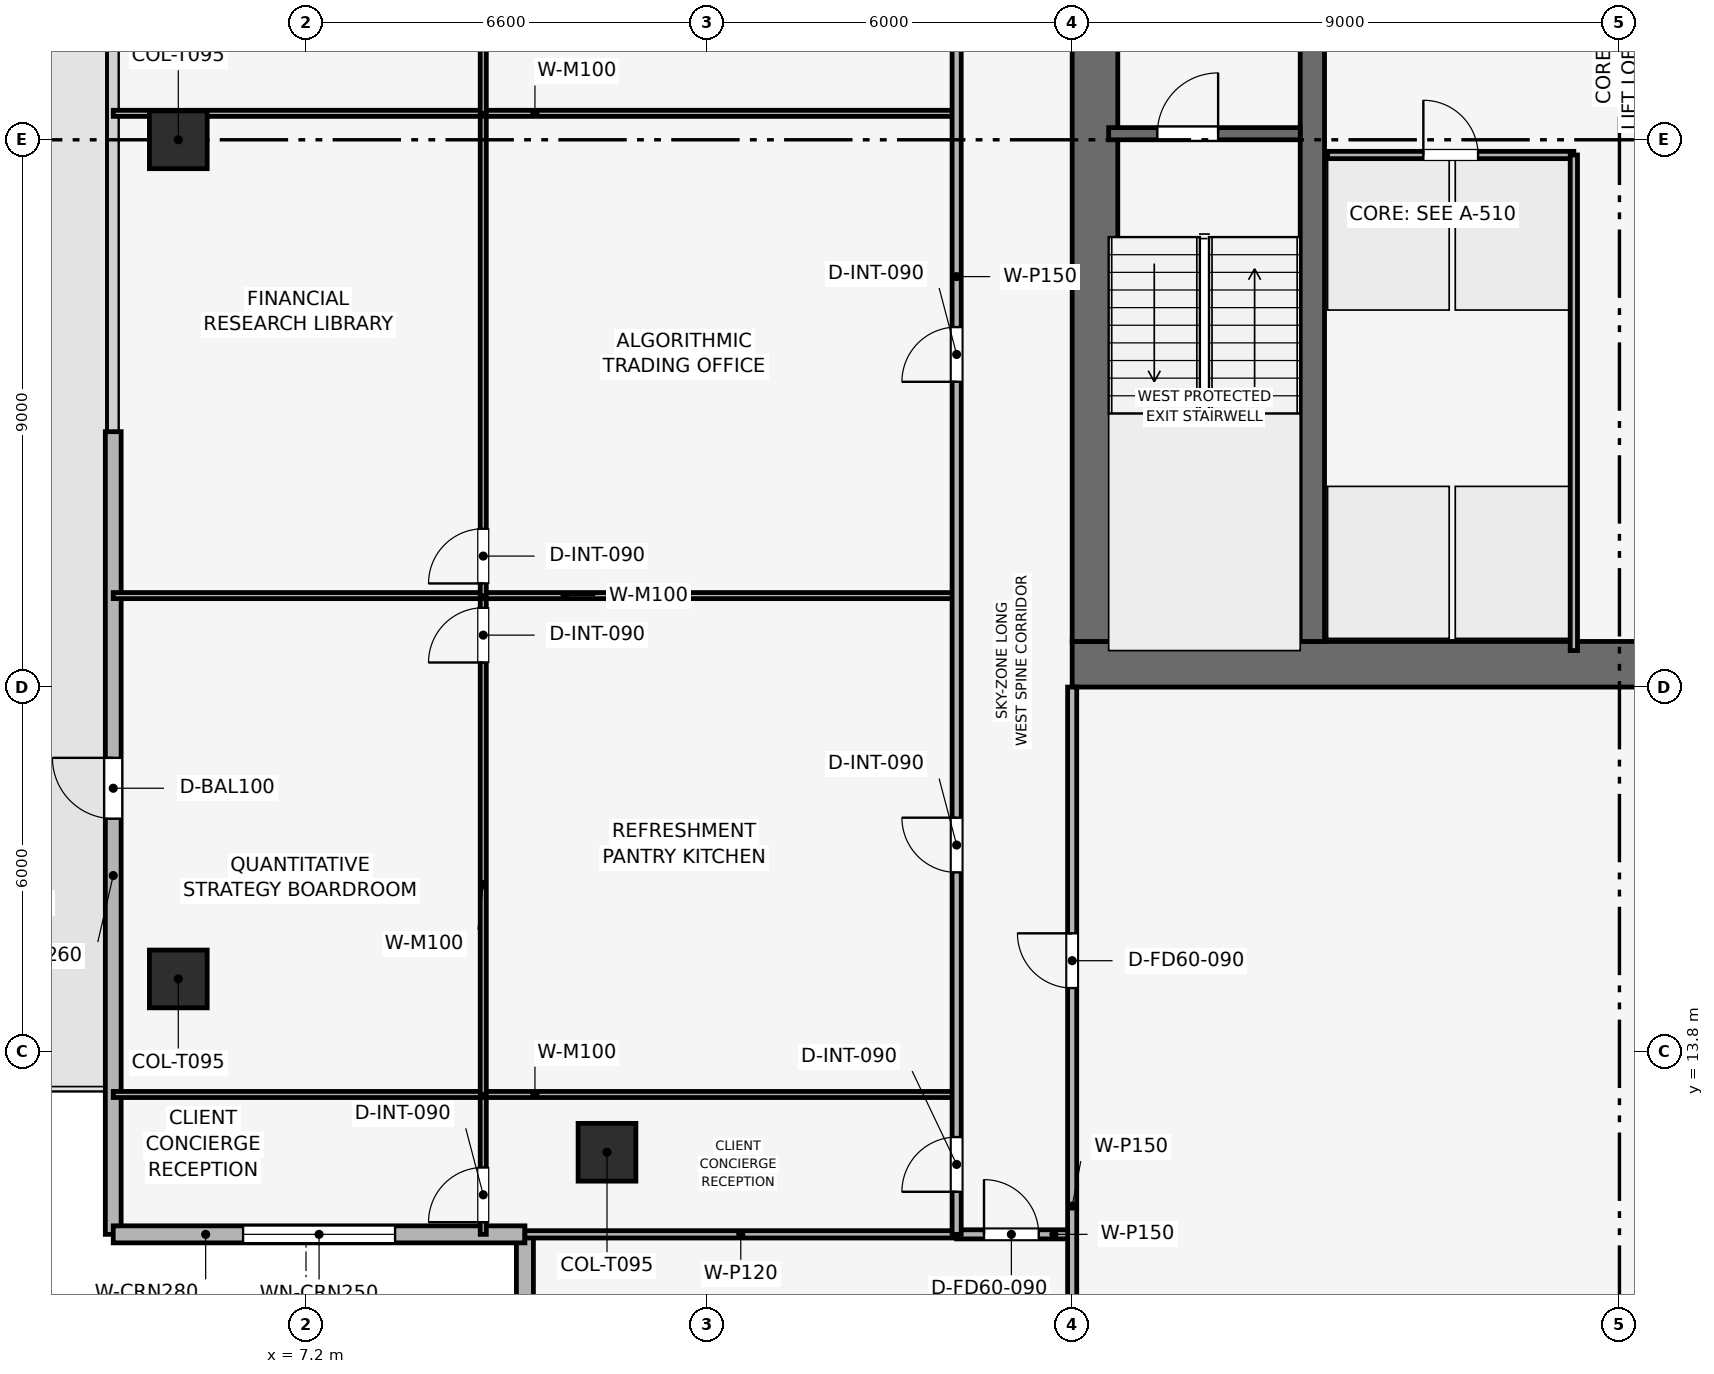
"""IFC4 building model, lengths in metres.
Left out: names, types, materials, properties, quantities, classifications, styles, units other than length and angle.
Written with IfcOpenShell. Run it as: python <this file> out.ifc"""

import sys

from ifc_helpers import new_model, si_unit, direction, frame, frame_2d, origin, origin_2d, place, context, subcontext, project, spatial, rectangle, extrude, element, fill, save


model = new_model("IFC4")
c1 = context("Model", 3, precision=1e-05, world=origin(), true_north=direction((0.0, 1.0)))
c2 = subcontext(c1, "Body", "Model", "MODEL_VIEW")
j1 = project(units=[si_unit("LENGTHUNIT", "METRE"), si_unit("PLANEANGLEUNIT", "RADIAN")], contexts=[c1])
p1 = place(None, origin())
s1 = spatial("IfcSite", under=j1, at=p1, CompositionType="ELEMENT")
p2 = place(p1, origin())
s2 = spatial("IfcBuilding", under=s1, at=p2, CompositionType="ELEMENT")
p3 = place(p2, frame((0.0, 0.0, 257.85)))
s3 = spatial("IfcBuildingStorey", under=s2, at=p3, CompositionType="ELEMENT", Elevation=257.85)
p4 = place(p3, frame((19.8, 20.175, 0.0), z_axis=(0.0, 0.0, 1.0), x_axis=(1.0, 0.0, 0.0)))
e1 = element("IfcWall", 1, at=p4, inside=s3, PredefinedType="SHEAR", context=c2, shape_type="SweptSolid", body=[
    extrude(rectangle(XDim=18.0, YDim=0.75, at=frame_2d((9.0, 0.0))), origin(), (0.0, 0.0, 1.0), 3.75),
])
p5 = place(p3, frame((20.175, 20.55, 0.0), z_axis=(0.0, 0.0, 1.0), x_axis=(0.0, 1.0, 0.0)))
e2 = element("IfcWall", 2, at=p5, inside=s3, PredefinedType="SHEAR", context=c2, shape_type="SweptSolid", body=[
    extrude(rectangle(XDim=16.5, YDim=0.75, at=frame_2d((8.25, 0.0))), origin(), (0.0, 0.0, 1.0), 3.75),
])
p6 = place(p5, frame((10.25, 0.0, 0.0)))
e3 = element("IfcOpeningElement", 3, at=p6, cuts=e2, PredefinedType="OPENING", context=c2, shape_type="SweptSolid", body=[
    extrude(rectangle(XDim=1.1, YDim=2.15, at=frame_2d((0.55, 1.075))), frame((0.0, 0.385, 0.0), z_axis=(0.0, -1.0, 0.0), x_axis=(1.0, 0.0, 0.0)), (0.0, 0.0, 1.0), 0.77),
])
p7 = place(p3, frame((23.75, 20.55, 0.0), z_axis=(0.0, 0.0, 1.0), x_axis=(0.0, 1.0, 0.0)))
e4 = element("IfcWall", 4, at=p7, inside=s3, PredefinedType="SHEAR", context=c2, shape_type="SweptSolid", body=[
    extrude(rectangle(XDim=16.5, YDim=0.4, at=frame_2d((8.25, 0.0))), origin(), (0.0, 0.0, 1.0), 3.75),
])
for number, where, z_axis, x_axis in (
    (5, (5.1, 28.8, 0.003), (0.0, 0.0, 1.0), (1.0, 0.0, 0.0)),
    (6, (5.1, 15.0, 0.003), (0.0, 0.0, 1.0), (1.0, 0.0, 0.0)),
    (7, (12.15, 12.15, 0.003), (0.0, 0.0, 1.0), (1.0, 0.0, 0.0)),
):
    element("IfcColumn", number, at=place(p3, frame(where, z_axis=z_axis, x_axis=x_axis)), inside=s3, PredefinedType="COLUMN", context=c2, shape_type="SweptSolid", body=[
        extrude(rectangle(XDim=0.95, YDim=0.95, at=origin_2d()), origin(), (0.0, 0.0, 1.0), 3.494),
    ])
p8 = place(p3, frame((4.03, 10.8, 0.0), z_axis=(0.0, 0.0, 1.0), x_axis=(0.0, 1.0, 0.0)))
e8 = element("IfcWall", 8, at=p8, inside=s3, PredefinedType="SOLIDWALL", context=c2, shape_type="SweptSolid", body=[
    extrude(rectangle(XDim=13.2, YDim=0.26, at=frame_2d((6.6, 0.0))), origin(), (0.0, 0.0, 1.0), 3.5),
])
p9 = place(p8, frame((6.836, 0.0, 0.0)))
e9 = element("IfcOpeningElement", 9, at=p9, cuts=e8, PredefinedType="OPENING", context=c2, shape_type="SweptSolid", body=[
    extrude(rectangle(XDim=1.0, YDim=2.2, at=frame_2d((0.5, 1.1))), frame((0.0, 0.14, 0.0), z_axis=(0.0, -1.0, 0.0), x_axis=(1.0, 0.0, 0.0)), (0.0, 0.0, 1.0), 0.28),
])
p10 = place(p3, frame((10.8, 4.03, 0.0), z_axis=(0.0, 0.0, 1.0), x_axis=(0.0, 1.0, 0.0)))
e10 = element("IfcWall", 10, at=p10, inside=s3, PredefinedType="SOLIDWALL", context=c2, shape_type="SweptSolid", body=[
    extrude(rectangle(XDim=6.77, YDim=0.28, at=frame_2d((3.385, 0.0))), origin(), (0.0, 0.0, 1.0), 3.5),
])
p11 = place(p10, frame((2.135, 0.0, 0.9)))
e11 = element("IfcOpeningElement", 11, at=p11, cuts=e10, PredefinedType="OPENING", context=c2, shape_type="SweptSolid", body=[
    extrude(rectangle(XDim=2.5, YDim=1.9, at=frame_2d((1.25, 0.95))), frame((0.0, 0.15, 0.0), z_axis=(0.0, -1.0, 0.0), x_axis=(1.0, 0.0, 0.0)), (0.0, 0.0, 1.0), 0.3),
])
p12 = place(p3, frame((10.8, 10.8, 0.0), z_axis=(0.0, 0.0, 1.0), x_axis=(-1.0, 0.0, 0.0)))
e12 = element("IfcWall", 12, at=p12, inside=s3, PredefinedType="SOLIDWALL", context=c2, shape_type="SweptSolid", body=[
    extrude(rectangle(XDim=6.77, YDim=0.28, at=frame_2d((3.385, 0.0))), origin(), (0.0, 0.0, 1.0), 3.5),
])
p13 = place(p12, frame((2.135, 0.0, 0.9)))
e13 = element("IfcOpeningElement", 13, at=p13, cuts=e12, PredefinedType="OPENING", context=c2, shape_type="SweptSolid", body=[
    extrude(rectangle(XDim=2.5, YDim=1.9, at=frame_2d((1.25, 0.95))), frame((0.0, 0.15, 0.0), z_axis=(0.0, -1.0, 0.0), x_axis=(1.0, 0.0, 0.0)), (0.0, 0.0, 1.0), 0.3),
])
p14 = place(p3, frame((20.4, 28.9, 0.0), z_axis=(0.0, 0.0, 1.0), x_axis=(1.0, 0.0, 0.0)))
e14 = element("IfcWall", 14, at=p14, inside=s3, PredefinedType="SHEAR", context=c2, shape_type="SweptSolid", body=[
    extrude(rectangle(XDim=3.15, YDim=0.2, at=frame_2d((1.575, 0.0))), origin(), (0.0, 0.0, 1.0), 3.5),
])
p15 = place(p14, frame((0.8, 0.0, 0.0)))
e15 = element("IfcOpeningElement", 15, at=p15, cuts=e14, PredefinedType="OPENING", context=c2, shape_type="SweptSolid", body=[
    extrude(rectangle(XDim=1.0, YDim=2.1, at=frame_2d((0.5, 1.05))), frame((0.0, 0.11, 0.0), z_axis=(0.0, -1.0, 0.0), x_axis=(1.0, 0.0, 0.0)), (0.0, 0.0, 1.0), 0.22),
])
p16 = place(p3, frame((24.0, 28.55, 0.0), z_axis=(0.0, 0.0, 1.0), x_axis=(1.0, 0.0, 0.0)))
e16 = element("IfcWall", 16, at=p16, inside=s3, PredefinedType="PARTITIONING", context=c2, shape_type="SweptSolid", body=[
    extrude(rectangle(XDim=4.05, YDim=0.12, at=frame_2d((2.025, 0.0))), origin(), (0.0, 0.0, 1.0), 3.5),
])
p17 = place(p16, frame((1.575, 0.0, 0.0)))
e17 = element("IfcOpeningElement", 17, at=p17, cuts=e16, PredefinedType="OPENING", context=c2, shape_type="SweptSolid", body=[
    extrude(rectangle(XDim=0.9, YDim=2.1, at=frame_2d((0.45, 1.05))), frame((0.0, 0.07, 0.0), z_axis=(0.0, -1.0, 0.0), x_axis=(1.0, 0.0, 0.0)), (0.0, 0.0, 1.0), 0.14),
])
p18 = place(p3, frame((28.05, 20.4, 0.0), z_axis=(0.0, 0.0, 1.0), x_axis=(0.0, 1.0, 0.0)))
e18 = element("IfcWall", 18, at=p18, inside=s3, PredefinedType="PARTITIONING", context=c2, shape_type="SweptSolid", body=[
    extrude(rectangle(XDim=8.15, YDim=0.12, at=frame_2d((4.075, 0.0))), origin(), (0.0, 0.0, 1.0), 3.5),
])
p19 = place(p3, frame((10.115, 10.8, 0.0), z_axis=(0.0, 0.0, 1.0), x_axis=(0.0, 1.0, 0.0)))
e19 = element("IfcWall", 19, at=p19, inside=s3, PredefinedType="MOVABLE", context=c2, shape_type="SweptSolid", body=[
    extrude(rectangle(XDim=2.3, YDim=0.1, at=frame_2d((1.15, 0.0))), origin(), (0.0, 0.0, 1.0), 3.085),
])
p20 = place(p19, frame((0.2, 0.0, 0.0)))
e20 = element("IfcOpeningElement", 20, at=p20, cuts=e19, PredefinedType="OPENING", context=c2, shape_type="SweptSolid", body=[
    extrude(rectangle(XDim=0.9, YDim=2.1, at=frame_2d((0.45, 1.05))), frame((0.0, 0.06, 0.0), z_axis=(0.0, -1.0, 0.0), x_axis=(1.0, 0.0, 0.0)), (0.0, 0.0, 1.0), 0.12),
])
p21 = place(p3, frame((4.03, 13.1, 0.0), z_axis=(0.0, 0.0, 1.0), x_axis=(1.0, 0.0, 0.0)))
e21 = element("IfcWall", 21, at=p21, inside=s3, PredefinedType="MOVABLE", context=c2, shape_type="SweptSolid", body=[
    extrude(rectangle(XDim=13.87, YDim=0.1, at=frame_2d((6.935, 0.0))), origin(), (0.0, 0.0, 1.0), 3.085),
])
p22 = place(p3, frame((10.115, 13.1, 0.0), z_axis=(0.0, 0.0, 1.0), x_axis=(0.0, 1.0, 0.0)))
e22 = element("IfcWall", 22, at=p22, inside=s3, PredefinedType="MOVABLE", context=c2, shape_type="SweptSolid", body=[
    extrude(rectangle(XDim=8.204, YDim=0.1, at=frame_2d((4.102, 0.0))), origin(), (0.0, 0.0, 1.0), 3.085),
])
p23 = place(p22, frame((7.104, 0.0, 0.0)))
e23 = element("IfcOpeningElement", 23, at=p23, cuts=e22, PredefinedType="OPENING", context=c2, shape_type="SweptSolid", body=[
    extrude(rectangle(XDim=0.9, YDim=2.1, at=frame_2d((0.45, 1.05))), frame((0.0, 0.06, 0.0), z_axis=(0.0, -1.0, 0.0), x_axis=(1.0, 0.0, 0.0)), (0.0, 0.0, 1.0), 0.12),
])
p24 = place(p3, frame((4.03, 21.304, 0.0), z_axis=(0.0, 0.0, 1.0), x_axis=(1.0, 0.0, 0.0)))
e24 = element("IfcWall", 24, at=p24, inside=s3, PredefinedType="MOVABLE", context=c2, shape_type="SweptSolid", body=[
    extrude(rectangle(XDim=13.87, YDim=0.1, at=frame_2d((6.935, 0.0))), origin(), (0.0, 0.0, 1.0), 3.085),
])
p25 = place(p3, frame((10.115, 21.304, 0.0), z_axis=(0.0, 0.0, 1.0), x_axis=(0.0, 1.0, 0.0)))
e25 = element("IfcWall", 25, at=p25, inside=s3, PredefinedType="MOVABLE", context=c2, shape_type="SweptSolid", body=[
    extrude(rectangle(XDim=7.931, YDim=0.1, at=frame_2d((3.966, 0.0))), origin(), (0.0, 0.0, 1.0), 3.085),
])
p26 = place(p25, frame((0.2, 0.0, 0.0)))
e26 = element("IfcOpeningElement", 26, at=p26, cuts=e25, PredefinedType="OPENING", context=c2, shape_type="SweptSolid", body=[
    extrude(rectangle(XDim=0.9, YDim=2.1, at=frame_2d((0.45, 1.05))), frame((0.0, 0.06, 0.0), z_axis=(0.0, -1.0, 0.0), x_axis=(1.0, 0.0, 0.0)), (0.0, 0.0, 1.0), 0.12),
])
p27 = place(p3, frame((4.03, 29.235, 0.0), z_axis=(0.0, 0.0, 1.0), x_axis=(1.0, 0.0, 0.0)))
e27 = element("IfcWall", 27, at=p27, inside=s3, PredefinedType="MOVABLE", context=c2, shape_type="SweptSolid", body=[
    extrude(rectangle(XDim=13.87, YDim=0.1, at=frame_2d((6.935, 0.0))), origin(), (0.0, 0.0, 1.0), 3.085),
])
p28 = place(p3, frame((10.115, 29.235, 0.0), z_axis=(0.0, 0.0, 1.0), x_axis=(0.0, 1.0, 0.0)))
e28 = element("IfcWall", 28, at=p28, inside=s3, PredefinedType="MOVABLE", context=c2, shape_type="SweptSolid", body=[
    extrude(rectangle(XDim=10.465, YDim=0.1, at=frame_2d((5.232, 0.0))), origin(), (0.0, 0.0, 1.0), 3.085),
])
p29 = place(p28, frame((5.928, 0.0, 0.0)))
e29 = element("IfcOpeningElement", 29, at=p29, cuts=e28, PredefinedType="OPENING", context=c2, shape_type="SweptSolid", body=[
    extrude(rectangle(XDim=0.9, YDim=2.1, at=frame_2d((0.45, 1.05))), frame((0.0, 0.06, 0.0), z_axis=(0.0, -1.0, 0.0), x_axis=(1.0, 0.0, 0.0)), (0.0, 0.0, 1.0), 0.12),
])
p30 = place(p3, frame((10.8, 10.8, 0.0), z_axis=(0.0, 0.0, 1.0), x_axis=(1.0, 0.0, 0.0)))
e30 = element("IfcWall", 30, at=p30, inside=s3, PredefinedType="PARTITIONING", context=c2, shape_type="SweptSolid", body=[
    extrude(rectangle(XDim=7.1, YDim=0.12, at=frame_2d((3.55, 0.0))), origin(), (0.0, 0.0, 1.0), 3.085),
])
p31 = place(p3, frame((17.9, 10.8, 0.0), z_axis=(0.0, 0.0, 1.0), x_axis=(1.0, 0.0, 0.0)))
e31 = element("IfcWall", 31, at=p31, inside=s3, PredefinedType="PARTITIONING", context=c2, shape_type="SweptSolid", body=[
    extrude(rectangle(XDim=1.9, YDim=0.15, at=frame_2d((0.95, 0.0))), origin(), (0.0, 0.0, 1.0), 3.5),
])
p32 = place(p31, frame((0.45, 0.0, 0.0)))
e32 = element("IfcOpeningElement", 32, at=p32, cuts=e31, PredefinedType="OPENING", context=c2, shape_type="SweptSolid", body=[
    extrude(rectangle(XDim=0.9, YDim=2.1, at=frame_2d((0.45, 1.05))), frame((0.0, 0.085, 0.0), z_axis=(0.0, -1.0, 0.0), x_axis=(1.0, 0.0, 0.0)), (0.0, 0.0, 1.0), 0.17),
])
p33 = place(p3, frame((19.8, 4.03, 0.0), z_axis=(0.0, 0.0, 1.0), x_axis=(0.0, 1.0, 0.0)))
e33 = element("IfcWall", 33, at=p33, inside=s3, PredefinedType="PARTITIONING", context=c2, shape_type="SweptSolid", body=[
    extrude(rectangle(XDim=15.77, YDim=0.15, at=frame_2d((7.885, 0.0))), origin(), (0.0, 0.0, 1.0), 3.085),
])
p34 = place(p33, frame((10.82, 0.0, 0.0)))
e34 = element("IfcOpeningElement", 34, at=p34, cuts=e33, PredefinedType="OPENING", context=c2, shape_type="SweptSolid", body=[
    extrude(rectangle(XDim=0.9, YDim=2.1, at=frame_2d((0.45, 1.05))), frame((0.0, 0.085, 0.0), z_axis=(0.0, -1.0, 0.0), x_axis=(1.0, 0.0, 0.0)), (0.0, 0.0, 1.0), 0.17),
])
p35 = place(p3, frame((17.9, 10.8, 0.0), z_axis=(0.0, 0.0, 1.0), x_axis=(0.0, 1.0, 0.0)))
e35 = element("IfcWall", 35, at=p35, inside=s3, PredefinedType="PARTITIONING", context=c2, shape_type="SweptSolid", body=[
    extrude(rectangle(XDim=28.9, YDim=0.15, at=frame_2d((14.45, 0.0))), origin(), (0.0, 0.0, 1.0), 3.085),
])
p36 = place(p35, frame((0.7, 0.0, 0.0)))
e36 = element("IfcOpeningElement", 36, at=p36, cuts=e35, PredefinedType="OPENING", context=c2, shape_type="SweptSolid", body=[
    extrude(rectangle(XDim=0.9, YDim=2.1, at=frame_2d((0.45, 1.05))), frame((0.0, 0.085, 0.0), z_axis=(0.0, -1.0, 0.0), x_axis=(1.0, 0.0, 0.0)), (0.0, 0.0, 1.0), 0.17),
])
p37 = place(p35, frame((5.952, 0.0, 0.0)))
e37 = element("IfcOpeningElement", 37, at=p37, cuts=e35, PredefinedType="OPENING", context=c2, shape_type="SweptSolid", body=[
    extrude(rectangle(XDim=0.9, YDim=2.1, at=frame_2d((0.45, 1.05))), frame((0.0, 0.085, 0.0), z_axis=(0.0, -1.0, 0.0), x_axis=(1.0, 0.0, 0.0)), (0.0, 0.0, 1.0), 0.17),
])
p38 = place(p35, frame((14.02, 0.0, 0.0)))
e38 = element("IfcOpeningElement", 38, at=p38, cuts=e35, PredefinedType="OPENING", context=c2, shape_type="SweptSolid", body=[
    extrude(rectangle(XDim=0.9, YDim=2.1, at=frame_2d((0.45, 1.05))), frame((0.0, 0.085, 0.0), z_axis=(0.0, -1.0, 0.0), x_axis=(1.0, 0.0, 0.0)), (0.0, 0.0, 1.0), 0.17),
])
p39 = place(p35, frame((23.217, 0.0, 0.0)))
e39 = element("IfcOpeningElement", 39, at=p39, cuts=e35, PredefinedType="OPENING", context=c2, shape_type="SweptSolid", body=[
    extrude(rectangle(XDim=0.9, YDim=2.1, at=frame_2d((0.45, 1.05))), frame((0.0, 0.085, 0.0), z_axis=(0.0, -1.0, 0.0), x_axis=(1.0, 0.0, 0.0)), (0.0, 0.0, 1.0), 0.17),
])
p40 = place(p9, origin())
e40 = element("IfcDoor", 40, at=p40, inside=s3, OperationType="SINGLE_SWING_RIGHT", PredefinedType="DOOR", context=c2, shape_type="SweptSolid", body=[
    extrude(rectangle(XDim=1.0, YDim=2.2, at=frame_2d((0.5, 1.1))), frame((0.0, 0.025, 0.0), z_axis=(0.0, -1.0, 0.0), x_axis=(1.0, 0.0, 0.0)), (0.0, 0.0, 1.0), 0.05),
])
fill(e9, e40)
p41 = place(p13, origin())
e41 = element("IfcWindow", 41, at=p41, inside=s3, PartitioningType="SINGLE_PANEL", PredefinedType="WINDOW", context=c2, shape_type="SweptSolid", body=[
    extrude(rectangle(XDim=2.5, YDim=1.9, at=frame_2d((1.25, 0.95))), frame((0.0, 0.03, 0.0), z_axis=(0.0, -1.0, 0.0), x_axis=(1.0, 0.0, 0.0)), (0.0, 0.0, 1.0), 0.06),
])
fill(e13, e41)
p42 = place(p15, origin())
e42 = element("IfcDoor", 42, at=p42, inside=s3, OperationType="SINGLE_SWING_RIGHT", PredefinedType="DOOR", context=c2, shape_type="SweptSolid", body=[
    extrude(rectangle(XDim=1.0, YDim=2.1, at=frame_2d((0.5, 1.05))), frame((0.0, 0.025, 0.0), z_axis=(0.0, -1.0, 0.0), x_axis=(1.0, 0.0, 0.0)), (0.0, 0.0, 1.0), 0.05),
])
fill(e15, e42)
p43 = place(p17, origin())
e43 = element("IfcDoor", 43, at=p43, inside=s3, OperationType="SINGLE_SWING_LEFT", PredefinedType="DOOR", context=c2, shape_type="SweptSolid", body=[
    extrude(rectangle(XDim=0.9, YDim=2.1, at=frame_2d((0.45, 1.05))), frame((0.0, 0.025, 0.0), z_axis=(0.0, -1.0, 0.0), x_axis=(1.0, 0.0, 0.0)), (0.0, 0.0, 1.0), 0.05),
])
fill(e17, e43)
p44 = place(p20, origin())
e44 = element("IfcDoor", 44, at=p44, inside=s3, OperationType="SINGLE_SWING_LEFT", PredefinedType="DOOR", context=c2, shape_type="SweptSolid", body=[
    extrude(rectangle(XDim=0.9, YDim=2.1, at=frame_2d((0.45, 1.05))), frame((0.0, 0.025, 0.0), z_axis=(0.0, -1.0, 0.0), x_axis=(1.0, 0.0, 0.0)), (0.0, 0.0, 1.0), 0.05),
])
fill(e20, e44)
p45 = place(p23, origin())
e45 = element("IfcDoor", 45, at=p45, inside=s3, OperationType="SINGLE_SWING_LEFT", PredefinedType="DOOR", context=c2, shape_type="SweptSolid", body=[
    extrude(rectangle(XDim=0.9, YDim=2.1, at=frame_2d((0.45, 1.05))), frame((0.0, 0.025, 0.0), z_axis=(0.0, -1.0, 0.0), x_axis=(1.0, 0.0, 0.0)), (0.0, 0.0, 1.0), 0.05),
])
fill(e23, e45)
p46 = place(p26, origin())
e46 = element("IfcDoor", 46, at=p46, inside=s3, OperationType="SINGLE_SWING_LEFT", PredefinedType="DOOR", context=c2, shape_type="SweptSolid", body=[
    extrude(rectangle(XDim=0.9, YDim=2.1, at=frame_2d((0.45, 1.05))), frame((0.0, 0.025, 0.0), z_axis=(0.0, -1.0, 0.0), x_axis=(1.0, 0.0, 0.0)), (0.0, 0.0, 1.0), 0.05),
])
fill(e26, e46)
p47 = place(p32, origin())
e47 = element("IfcDoor", 47, at=p47, inside=s3, OperationType="SINGLE_SWING_LEFT", PredefinedType="DOOR", context=c2, shape_type="SweptSolid", body=[
    extrude(rectangle(XDim=0.9, YDim=2.1, at=frame_2d((0.45, 1.05))), frame((0.0, 0.025, 0.0), z_axis=(0.0, -1.0, 0.0), x_axis=(1.0, 0.0, 0.0)), (0.0, 0.0, 1.0), 0.05),
])
fill(e32, e47)
p48 = place(p34, origin())
e48 = element("IfcDoor", 48, at=p48, inside=s3, OperationType="SINGLE_SWING_RIGHT", PredefinedType="DOOR", context=c2, shape_type="SweptSolid", body=[
    extrude(rectangle(XDim=0.9, YDim=2.1, at=frame_2d((0.45, 1.05))), frame((0.0, 0.025, 0.0), z_axis=(0.0, -1.0, 0.0), x_axis=(1.0, 0.0, 0.0)), (0.0, 0.0, 1.0), 0.05),
])
fill(e34, e48)
p49 = place(p36, origin())
e49 = element("IfcDoor", 49, at=p49, inside=s3, OperationType="SINGLE_SWING_LEFT", PredefinedType="DOOR", context=c2, shape_type="SweptSolid", body=[
    extrude(rectangle(XDim=0.9, YDim=2.1, at=frame_2d((0.45, 1.05))), frame((0.0, 0.025, 0.0), z_axis=(0.0, -1.0, 0.0), x_axis=(1.0, 0.0, 0.0)), (0.0, 0.0, 1.0), 0.05),
])
fill(e36, e49)
p50 = place(p37, origin())
e50 = element("IfcDoor", 50, at=p50, inside=s3, OperationType="SINGLE_SWING_RIGHT", PredefinedType="DOOR", context=c2, shape_type="SweptSolid", body=[
    extrude(rectangle(XDim=0.9, YDim=2.1, at=frame_2d((0.45, 1.05))), frame((0.0, 0.025, 0.0), z_axis=(0.0, -1.0, 0.0), x_axis=(1.0, 0.0, 0.0)), (0.0, 0.0, 1.0), 0.05),
])
fill(e37, e50)
p51 = place(p38, origin())
e51 = element("IfcDoor", 51, at=p51, inside=s3, OperationType="SINGLE_SWING_LEFT", PredefinedType="DOOR", context=c2, shape_type="SweptSolid", body=[
    extrude(rectangle(XDim=0.9, YDim=2.1, at=frame_2d((0.45, 1.05))), frame((0.0, 0.025, 0.0), z_axis=(0.0, -1.0, 0.0), x_axis=(1.0, 0.0, 0.0)), (0.0, 0.0, 1.0), 0.05),
])
fill(e38, e51)
save(model, sys.argv[1])
